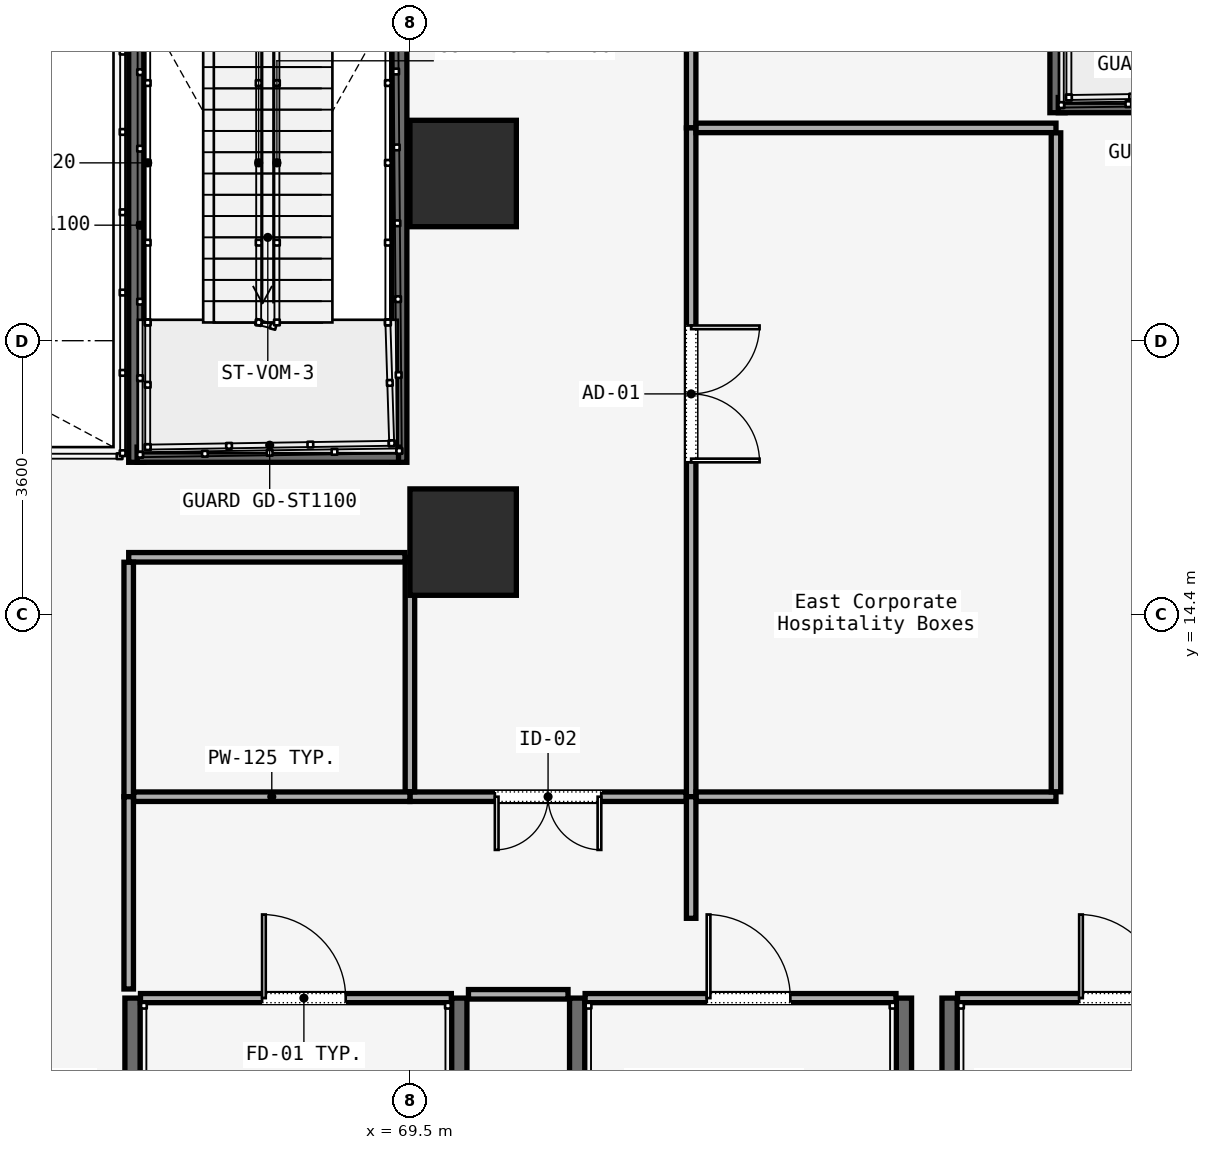
"""IFC4 building model, lengths in metres.
Left out: names, types, materials, properties, quantities, classifications, styles, units other than length and angle.
Written with IfcOpenShell. Run it as: python <this file> out.ifc"""

import sys

from ifc_helpers import new_model, si_unit, direction, frame, frame_2d, origin, origin_2d, place, context, subcontext, project, spatial, rectangle, extrude, element, fill, save


model = new_model("IFC4")
c1 = context("Model", 3, precision=1e-05, world=origin(), true_north=direction((0.0, 1.0)))
c2 = subcontext(c1, "Body", "Model", "MODEL_VIEW")
j1 = project(units=[si_unit("LENGTHUNIT", "METRE"), si_unit("PLANEANGLEUNIT", "RADIAN")], contexts=[c1])
p1 = place(None, origin())
s1 = spatial("IfcSite", under=j1, at=p1, CompositionType="ELEMENT")
p2 = place(p1, origin())
s2 = spatial("IfcBuilding", under=s1, at=p2, CompositionType="ELEMENT")
p3 = place(p2, frame((0.0, 0.0, 12.0)))
s3 = spatial("IfcBuildingStorey", under=s2, at=p3, CompositionType="ELEMENT", Elevation=12.0)
for number, where, z_axis, x_axis in (
    (1, (70.2, 15.35, 0.0), (0.0, 0.0, 1.0), (1.0, 0.0, 0.0)),
    (2, (70.2, 20.2, 0.0), (0.0, 0.0, 1.0), (1.0, 0.0, 0.0)),
):
    element("IfcColumn", number, at=place(p3, frame(where, z_axis=z_axis, x_axis=x_axis)), inside=s3, PredefinedType="COLUMN", context=c2, shape_type="SweptSolid", body=[
        extrude(rectangle(XDim=1.4, YDim=1.4, at=origin_2d()), origin(), (0.0, 0.0, 1.0), 5.7),
    ])
for number, where, z_axis, x_axis in (
    (3, (65.85, 9.35, 0.0), (0.0, 0.0, 1.0), (0.0, -1.0, 0.0)),
    (4, (70.15, 9.35, 0.0), (0.0, 0.0, 1.0), (0.0, -1.0, 0.0)),
):
    element("IfcWall", number, at=place(p3, frame(where, z_axis=z_axis, x_axis=x_axis)), inside=s3, PredefinedType="SOLIDWALL", context=c2, shape_type="SweptSolid", body=[
        extrude(rectangle(XDim=8.5, YDim=0.2, at=frame_2d((4.25, 0.0))), origin(), (0.0, 0.0, 1.0), 6.0),
    ])
p4 = place(p3, frame((65.955, 9.35, 0.0), z_axis=(0.0, 0.0, 1.0), x_axis=(1.0, 0.0, 0.0)))
e5 = element("IfcWall", 5, at=p4, inside=s3, PredefinedType="SOLIDWALL", context=c2, shape_type="SweptSolid", body=[
    extrude(rectangle(XDim=4.09, YDim=0.12, at=frame_2d((2.045, 0.0))), origin(), (0.0, 0.0, 1.0), 4.819),
])
p5 = place(p4, frame((1.6, 0.0, 0.0)))
e6 = element("IfcOpeningElement", 6, at=p5, cuts=e5, PredefinedType="OPENING", context=c2, shape_type="SweptSolid", body=[
    extrude(rectangle(XDim=1.1, YDim=2.2, at=frame_2d((0.55, 1.1))), frame((0.0, 0.06, 0.0), z_axis=(0.0, -1.0, 0.0), x_axis=(1.0, 0.0, 0.0)), (0.0, 0.0, 1.0), 0.12),
])
for number, where, z_axis, x_axis in (
    (7, (71.7, 9.35, 0.0), (0.0, 0.0, 1.0), (0.0, -1.0, 0.0)),
    (8, (76.0, 9.35, 0.0), (0.0, 0.0, 1.0), (0.0, -1.0, 0.0)),
):
    element("IfcWall", number, at=place(p3, frame(where, z_axis=z_axis, x_axis=x_axis)), inside=s3, PredefinedType="SOLIDWALL", context=c2, shape_type="SweptSolid", body=[
        extrude(rectangle(XDim=8.5, YDim=0.2, at=frame_2d((4.25, 0.0))), origin(), (0.0, 0.0, 1.0), 6.0),
    ])
p6 = place(p3, frame((71.805, 9.35, 0.0), z_axis=(0.0, 0.0, 1.0), x_axis=(1.0, 0.0, 0.0)))
e9 = element("IfcWall", 9, at=p6, inside=s3, PredefinedType="SOLIDWALL", context=c2, shape_type="SweptSolid", body=[
    extrude(rectangle(XDim=4.09, YDim=0.12, at=frame_2d((2.045, 0.0))), origin(), (0.0, 0.0, 1.0), 4.819),
])
p7 = place(p6, frame((1.6, 0.0, 0.0)))
e10 = element("IfcOpeningElement", 10, at=p7, cuts=e9, PredefinedType="OPENING", context=c2, shape_type="SweptSolid", body=[
    extrude(rectangle(XDim=1.1, YDim=2.2, at=frame_2d((0.55, 1.1))), frame((0.0, 0.06, 0.0), z_axis=(0.0, -1.0, 0.0), x_axis=(1.0, 0.0, 0.0)), (0.0, 0.0, 1.0), 0.12),
])
p8 = place(p3, frame((76.6, 9.35, 0.0), z_axis=(0.0, 0.0, 1.0), x_axis=(0.0, -1.0, 0.0)))
e11 = element("IfcWall", 11, at=p8, inside=s3, PredefinedType="SOLIDWALL", context=c2, shape_type="SweptSolid", body=[
    extrude(rectangle(XDim=8.5, YDim=0.2, at=frame_2d((4.25, 0.0))), origin(), (0.0, 0.0, 1.0), 6.0),
])
p9 = place(p3, frame((76.705, 9.35, 0.0), z_axis=(0.0, 0.0, 1.0), x_axis=(1.0, 0.0, 0.0)))
e12 = element("IfcWall", 12, at=p9, inside=s3, PredefinedType="SOLIDWALL", context=c2, shape_type="SweptSolid", body=[
    extrude(rectangle(XDim=4.09, YDim=0.12, at=frame_2d((2.045, 0.0))), origin(), (0.0, 0.0, 1.0), 4.819),
])
p10 = place(p9, frame((1.6, 0.0, 0.0)))
e13 = element("IfcOpeningElement", 13, at=p10, cuts=e12, PredefinedType="OPENING", context=c2, shape_type="SweptSolid", body=[
    extrude(rectangle(XDim=1.1, YDim=2.2, at=frame_2d((0.55, 1.1))), frame((0.0, 0.06, 0.0), z_axis=(0.0, -1.0, 0.0), x_axis=(1.0, 0.0, 0.0)), (0.0, 0.0, 1.0), 0.12),
])
p11 = place(p3, frame((78.02, 28.95, 0.0), z_axis=(0.0, 0.0, 1.0), x_axis=(0.0, -1.0, 0.0)))
e14 = element("IfcWall", 14, at=p11, inside=s3, PredefinedType="SOLIDWALL", context=c2, shape_type="SweptSolid", body=[
    extrude(rectangle(XDim=7.95, YDim=0.2, at=frame_2d((3.975, 0.0))), origin(), (0.0, 0.0, 1.0), 6.0),
])
p12 = place(p3, frame((78.03, 21.1, 0.0), z_axis=(0.0, 0.0, 1.0), x_axis=(1.0, 0.0, 0.0)))
e15 = element("IfcWall", 15, at=p12, inside=s3, PredefinedType="SOLIDWALL", context=c2, shape_type="SweptSolid", body=[
    extrude(rectangle(XDim=3.56, YDim=0.2, at=frame_2d((1.78, 0.0))), origin(), (0.0, 0.0, 1.0), 6.0),
])
for number, where, z_axis, x_axis in (
    (16, (65.9, 24.1, 0.0), (0.0, 0.0, 1.0), (0.0, -1.0, 0.0)),
    (17, (69.36, 24.1, 0.0), (0.0, 0.0, 1.0), (0.0, -1.0, 0.0)),
):
    element("IfcWall", number, at=place(p3, frame(where, z_axis=z_axis, x_axis=x_axis)), inside=s3, PredefinedType="SOLIDWALL", context=c2, shape_type="SweptSolid", body=[
        extrude(rectangle(XDim=7.7, YDim=0.2, at=frame_2d((3.85, 0.0))), origin(), (0.0, 0.0, 1.0), 6.0),
    ])
p13 = place(p3, frame((65.91, 16.5, 0.0), z_axis=(0.0, 0.0, 1.0), x_axis=(1.0, 0.0, 0.0)))
e18 = element("IfcWall", 18, at=p13, inside=s3, PredefinedType="SOLIDWALL", context=c2, shape_type="SweptSolid", body=[
    extrude(rectangle(XDim=3.44, YDim=0.2, at=frame_2d((1.72, 0.0))), origin(), (0.0, 0.0, 1.0), 6.0),
])
p14 = place(p3, frame((73.2, 43.585, 0.0), z_axis=(0.0, 0.0, 1.0), x_axis=(0.0, -1.0, 0.0)))
e19 = element("IfcWall", 19, at=p14, inside=s3, PredefinedType="PARTITIONING", context=c2, shape_type="SweptSolid", body=[
    extrude(rectangle(XDim=22.785, YDim=0.125, at=frame_2d((11.393, 0.0))), origin(), (0.0, 0.0, 1.0), 4.819),
])
p15 = place(p3, frame((73.2, 20.8, 0.0), z_axis=(0.0, 0.0, 1.0), x_axis=(0.0, -1.0, 0.0)))
e20 = element("IfcWall", 20, at=p15, inside=s3, PredefinedType="PARTITIONING", context=c2, shape_type="SweptSolid", body=[
    extrude(rectangle(XDim=8.8, YDim=0.125, at=frame_2d((4.4, 0.0))), origin(), (0.0, 0.0, 1.0), 4.819),
])
p16 = place(p15, frame((2.6, 0.0, 0.0)))
e21 = element("IfcOpeningElement", 21, at=p16, cuts=e20, PredefinedType="OPENING", context=c2, shape_type="SweptSolid", body=[
    extrude(rectangle(XDim=1.8, YDim=2.3, at=frame_2d((0.9, 1.15))), frame((0.0, 0.062, 0.0), z_axis=(0.0, -1.0, 0.0), x_axis=(1.0, 0.0, 0.0)), (0.0, 0.0, 1.0), 0.125),
])
p17 = place(p3, frame((73.135, 12.0, 0.0), z_axis=(0.0, 0.0, 1.0), x_axis=(-1.0, 0.0, 0.0)))
e22 = element("IfcWall", 22, at=p17, inside=s3, PredefinedType="PARTITIONING", context=c2, shape_type="SweptSolid", body=[
    extrude(rectangle(XDim=3.635, YDim=0.125, at=frame_2d((1.817, 0.0))), origin(), (0.0, 0.0, 1.0), 4.819),
])
p18 = place(p17, frame((1.117, 0.0, 0.0)))
e23 = element("IfcOpeningElement", 23, at=p18, cuts=e22, PredefinedType="OPENING", context=c2, shape_type="SweptSolid", body=[
    extrude(rectangle(XDim=1.4, YDim=2.2, at=frame_2d((0.7, 1.1))), frame((0.0, 0.062, 0.0), z_axis=(0.0, -1.0, 0.0), x_axis=(1.0, 0.0, 0.0)), (0.0, 0.0, 1.0), 0.125),
])
p19 = place(p3, frame((69.5, 12.065, 0.0), z_axis=(0.0, 0.0, 1.0), x_axis=(0.0, 1.0, 0.0)))
e24 = element("IfcWall", 24, at=p19, inside=s3, PredefinedType="PARTITIONING", context=c2, shape_type="SweptSolid", body=[
    extrude(rectangle(XDim=3.085, YDim=0.125, at=frame_2d((1.542, 0.0))), origin(), (0.0, 0.0, 1.0), 4.819),
])
p20 = place(p3, frame((69.435, 15.15, 0.0), z_axis=(0.0, 0.0, 1.0), x_axis=(-1.0, 0.0, 0.0)))
e25 = element("IfcWall", 25, at=p20, inside=s3, PredefinedType="PARTITIONING", context=c2, shape_type="SweptSolid", body=[
    extrude(rectangle(XDim=3.635, YDim=0.125, at=frame_2d((1.817, 0.0))), origin(), (0.0, 0.0, 1.0), 4.819),
])
p21 = place(p3, frame((65.8, 15.085, 0.0), z_axis=(0.0, 0.0, 1.0), x_axis=(0.0, -1.0, 0.0)))
e26 = element("IfcWall", 26, at=p21, inside=s3, PredefinedType="PARTITIONING", context=c2, shape_type="SweptSolid", body=[
    extrude(rectangle(XDim=3.085, YDim=0.125, at=frame_2d((1.542, 0.0))), origin(), (0.0, 0.0, 1.0), 4.819),
])
p22 = place(p3, frame((65.8, 12.0, 0.0), z_axis=(0.0, 0.0, 1.0), x_axis=(0.0, -1.0, 0.0)))
e27 = element("IfcWall", 27, at=p22, inside=s3, PredefinedType="PARTITIONING", context=c2, shape_type="SweptSolid", body=[
    extrude(rectangle(XDim=2.53, YDim=0.125, at=frame_2d((1.265, 0.0))), origin(), (0.0, 0.0, 1.0), 4.819),
])
for number, where, z_axis, x_axis in (
    (28, (78.0, 12.0, 0.0), (0.0, 0.0, 1.0), (-1.0, 0.0, 0.0)),
    (29, (73.265, 20.8, 0.0), (0.0, 0.0, 1.0), (1.0, 0.0, 0.0)),
):
    element("IfcWall", number, at=place(p3, frame(where, z_axis=z_axis, x_axis=x_axis)), inside=s3, PredefinedType="PARTITIONING", context=c2, shape_type="SweptSolid", body=[
        extrude(rectangle(XDim=4.735, YDim=0.125, at=frame_2d((2.368, 0.0))), origin(), (0.0, 0.0, 1.0), 4.819),
    ])
p23 = place(p3, frame((78.0, 20.735, 0.0), z_axis=(0.0, 0.0, 1.0), x_axis=(0.0, -1.0, 0.0)))
e30 = element("IfcWall", 30, at=p23, inside=s3, PredefinedType="PARTITIONING", context=c2, shape_type="SweptSolid", body=[
    extrude(rectangle(XDim=8.67, YDim=0.125, at=frame_2d((4.335, 0.0))), origin(), (0.0, 0.0, 1.0), 4.819),
])
p24 = place(p3, frame((71.58, 9.4, 0.0), z_axis=(0.0, 0.0, 1.0), x_axis=(-1.0, 0.0, 0.0)))
e31 = element("IfcWall", 31, at=p24, inside=s3, PredefinedType="PARTITIONING", context=c2, shape_type="SweptSolid", body=[
    extrude(rectangle(XDim=1.31, YDim=0.125, at=frame_2d((0.655, 0.0))), origin(), (0.0, 0.0, 1.0), 4.819),
])
p25 = place(p3, frame((65.865, 12.0, 0.0), z_axis=(0.0, 0.0, 1.0), x_axis=(1.0, 0.0, 0.0)))
e32 = element("IfcWall", 32, at=p25, inside=s3, PredefinedType="PARTITIONING", context=c2, shape_type="SweptSolid", body=[
    extrude(rectangle(XDim=3.635, YDim=0.125, at=frame_2d((1.817, 0.0))), origin(), (0.0, 0.0, 1.0), 4.819),
])
p26 = place(p3, frame((73.2, 12.0, 0.0), z_axis=(0.0, 0.0, 1.0), x_axis=(0.0, -1.0, 0.0)))
e33 = element("IfcWall", 33, at=p26, inside=s3, PredefinedType="PARTITIONING", context=c2, shape_type="SweptSolid", body=[
    extrude(rectangle(XDim=1.6, YDim=0.125, at=frame_2d((0.8, 0.0))), origin(), (0.0, 0.0, 1.0), 4.819),
])
p27 = place(p5, origin())
e34 = element("IfcDoor", 34, at=p27, inside=s3, OperationType="SINGLE_SWING_LEFT", PredefinedType="DOOR", context=c2, shape_type="SweptSolid", body=[
    extrude(rectangle(XDim=1.1, YDim=2.2, at=frame_2d((0.55, 1.1))), frame((0.0, 0.025, 0.0), z_axis=(0.0, -1.0, 0.0), x_axis=(1.0, 0.0, 0.0)), (0.0, 0.0, 1.0), 0.05),
])
fill(e6, e34)
p28 = place(p7, origin())
e35 = element("IfcDoor", 35, at=p28, inside=s3, OperationType="SINGLE_SWING_LEFT", PredefinedType="DOOR", context=c2, shape_type="SweptSolid", body=[
    extrude(rectangle(XDim=1.1, YDim=2.2, at=frame_2d((0.55, 1.1))), frame((0.0, 0.025, 0.0), z_axis=(0.0, -1.0, 0.0), x_axis=(1.0, 0.0, 0.0)), (0.0, 0.0, 1.0), 0.05),
])
fill(e10, e35)
p29 = place(p10, origin())
e36 = element("IfcDoor", 36, at=p29, inside=s3, OperationType="SINGLE_SWING_LEFT", PredefinedType="DOOR", context=c2, shape_type="SweptSolid", body=[
    extrude(rectangle(XDim=1.1, YDim=2.2, at=frame_2d((0.55, 1.1))), frame((0.0, 0.025, 0.0), z_axis=(0.0, -1.0, 0.0), x_axis=(1.0, 0.0, 0.0)), (0.0, 0.0, 1.0), 0.05),
])
fill(e13, e36)
p30 = place(p16, origin())
e37 = element("IfcDoor", 37, at=p30, inside=s3, OperationType="SINGLE_SWING_LEFT", PredefinedType="DOOR", context=c2, shape_type="SweptSolid", body=[
    extrude(rectangle(XDim=1.8, YDim=2.3, at=frame_2d((0.9, 1.15))), frame((0.0, 0.025, 0.0), z_axis=(0.0, -1.0, 0.0), x_axis=(1.0, 0.0, 0.0)), (0.0, 0.0, 1.0), 0.05),
])
fill(e21, e37)
p31 = place(p18, origin())
e38 = element("IfcDoor", 38, at=p31, inside=s3, OperationType="SINGLE_SWING_LEFT", PredefinedType="DOOR", context=c2, shape_type="SweptSolid", body=[
    extrude(rectangle(XDim=1.4, YDim=2.2, at=frame_2d((0.7, 1.1))), frame((0.0, 0.025, 0.0), z_axis=(0.0, -1.0, 0.0), x_axis=(1.0, 0.0, 0.0)), (0.0, 0.0, 1.0), 0.05),
])
fill(e23, e38)
save(model, sys.argv[1])
